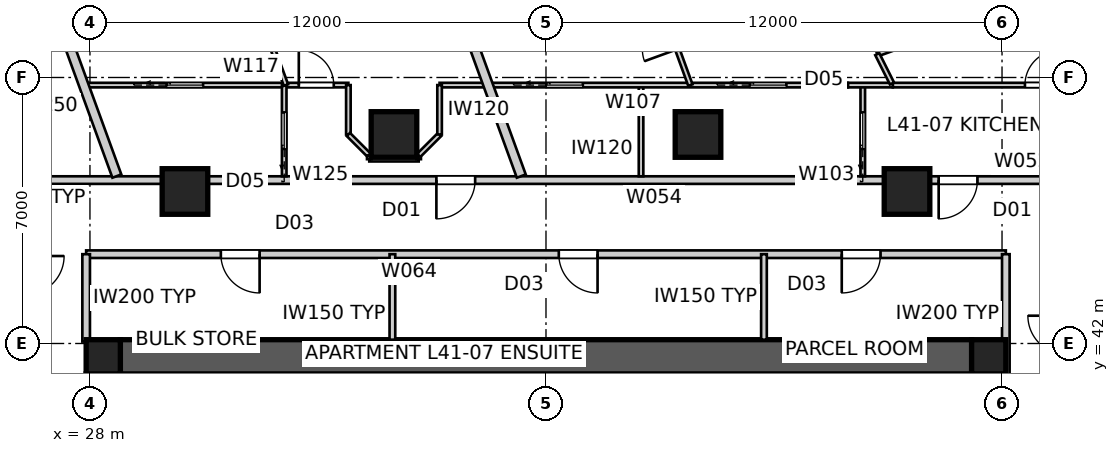
"""IFC4 building model, lengths in metres.
Left out: names, types, materials, properties, quantities, classifications, styles, units other than length and angle.
Written with IfcOpenShell. Run it as: python <this file> out.ifc"""

import sys

from ifc_helpers import new_model, si_unit, direction, frame, frame_2d, origin, origin_2d, place, context, subcontext, project, spatial, polyline, rectangle, outline, extrude, element, fill, save


model = new_model("IFC4")
c1 = context("Model", 3, precision=1e-05, world=origin(), true_north=direction((0.0, 1.0)))
c2 = subcontext(c1, "Body", "Model", "MODEL_VIEW")
j1 = project(units=[si_unit("LENGTHUNIT", "METRE"), si_unit("PLANEANGLEUNIT", "RADIAN")], contexts=[c1])
p1 = place(None, origin())
s1 = spatial("IfcSite", under=j1, at=p1, CompositionType="ELEMENT")
p2 = place(p1, origin())
s2 = spatial("IfcBuilding", under=s1, at=p2, CompositionType="ELEMENT")
p3 = place(p2, frame((0.0, 0.0, 150.6)))
s3 = spatial("IfcBuildingStorey", under=s2, at=p3, CompositionType="ELEMENT", Elevation=150.6)
p4 = place(p3, frame((28.8, 41.65, 0.0), z_axis=(0.0, 0.0, 1.0), x_axis=(1.0, 0.0, 0.0)))
e1 = element("IfcWall", 1, at=p4, inside=s3, PredefinedType="SHEAR", context=c2, shape_type="SweptSolid", body=[
    extrude(outline(polyline([(0.0, -0.45), (22.4, -0.45), (22.4, -0.025), (22.85, -0.025), (22.85, 0.025), (22.4, 0.025), (22.4, 0.45), (0.0, 0.45), (0.0, 0.025), (-0.45, 0.025), (-0.45, -0.025), (0.0, -0.025), (0.0, -0.45)])), origin(), (0.0, 0.0, 1.0), 3.4),
])
p5 = place(p3, frame((51.65, 18.8, 0.0), z_axis=(0.0, 0.0, 1.0), x_axis=(0.0, 1.0, 0.0)))
e2 = element("IfcWall", 2, at=p5, inside=s3, PredefinedType="SHEAR", context=c2, shape_type="SweptSolid", body=[
    extrude(outline(polyline([(0.0, -0.45), (22.4, -0.45), (22.4, -0.025), (22.85, -0.025), (22.85, 0.025), (22.4, 0.025), (22.4, 0.45), (0.0, 0.45), (0.0, 0.025), (-0.45, 0.025), (-0.45, -0.025), (0.0, -0.025), (0.0, -0.45)])), origin(), (0.0, 0.0, 1.0), 3.4),
])
p6 = place(p5, frame((11.14, 0.0, 0.0)))
e3 = element("IfcOpeningElement", 3, at=p6, cuts=e2, PredefinedType="OPENING", context=c2, shape_type="SweptSolid", body=[
    extrude(rectangle(XDim=1.02, YDim=2.4, at=frame_2d((0.51, 1.2))), frame((0.0, 0.46, 0.0), z_axis=(0.0, -1.0, 0.0), x_axis=(1.0, 0.0, 0.0)), (0.0, 0.0, 1.0), 0.92),
])
p7 = place(p3, frame((28.35, 41.2, 0.0), z_axis=(0.0, 0.0, 1.0), x_axis=(0.0, -1.0, 0.0)))
e4 = element("IfcWall", 4, at=p7, inside=s3, PredefinedType="SHEAR", context=c2, shape_type="SweptSolid", body=[
    extrude(outline(polyline([(0.0, -0.45), (22.4, -0.45), (22.4, -0.025), (22.85, -0.025), (22.85, 0.025), (22.4, 0.025), (22.4, 0.45), (0.0, 0.45), (0.0, 0.025), (-0.45, 0.025), (-0.45, -0.025), (0.0, -0.025), (0.0, -0.45)])), origin(), (0.0, 0.0, 1.0), 3.4),
])
p8 = place(p7, frame((11.14, 0.0, 0.0)))
e5 = element("IfcOpeningElement", 5, at=p8, cuts=e4, PredefinedType="OPENING", context=c2, shape_type="SweptSolid", body=[
    extrude(rectangle(XDim=1.02, YDim=2.4, at=frame_2d((0.51, 1.2))), frame((0.0, 0.46, 0.0), z_axis=(0.0, -1.0, 0.0), x_axis=(1.0, 0.0, 0.0)), (0.0, 0.0, 1.0), 0.92),
])
for number, where, z_axis, x_axis in (
    (6, (51.65, 41.65, 0.0), (0.0, 0.0, 1.0), (1.0, 0.0, 0.0)),
    (7, (28.35, 41.65, 0.0), (0.0, 0.0, 1.0), (1.0, 0.0, 0.0)),
):
    element("IfcColumn", number, at=place(p3, frame(where, z_axis=z_axis, x_axis=x_axis)), inside=s3, PredefinedType="COLUMN", context=c2, shape_type="SweptSolid", body=[
        extrude(rectangle(XDim=0.9, YDim=0.9, at=origin_2d()), origin(), (0.0, 0.0, 1.0), 3.4),
    ])
for number, where, z_axis, x_axis in (
    (8, (49.5, 46.0, 0.0), (0.0, 0.0, 1.0), (1.0, 0.0, 0.0)),
    (9, (44.0, 47.5, 0.0), (0.0, 0.0, 1.0), (1.0, 0.0, 0.0)),
    (10, (36.0, 47.5, 0.0), (0.0, 0.0, 1.0), (1.0, 0.0, 0.0)),
    (11, (30.5, 46.0, 0.0), (0.0, 0.0, 1.0), (1.0, 0.0, 0.0)),
):
    element("IfcColumn", number, at=place(p3, frame(where, z_axis=z_axis, x_axis=x_axis)), inside=s3, PredefinedType="COLUMN", context=c2, shape_type="SweptSolid", body=[
        extrude(rectangle(XDim=1.2, YDim=1.2, at=origin_2d()), origin(), (0.0, 0.0, 1.0), 3.4),
    ])
p9 = place(p3, frame((53.7, 46.3, 0.0), z_axis=(0.0, 0.0, 1.0), x_axis=(-1.0, 0.0, 0.0)))
e12 = element("IfcWall", 12, at=p9, inside=s3, PredefinedType="PARTITIONING", context=c2, shape_type="SweptSolid", body=[
    extrude(rectangle(XDim=4.458, YDim=0.2, at=frame_2d((2.229, 0.0))), origin(), (0.0, 0.0, 1.0), 3.25),
])
p10 = place(p9, frame((2.347, 0.0, 0.0)))
e13 = element("IfcOpeningElement", 13, at=p10, cuts=e12, PredefinedType="OPENING", context=c2, shape_type="SweptSolid", body=[
    extrude(rectangle(XDim=1.02, YDim=2.34, at=frame_2d((0.51, 1.17))), frame((0.0, 0.11, 0.0), z_axis=(0.0, -1.0, 0.0), x_axis=(1.0, 0.0, 0.0)), (0.0, 0.0, 1.0), 0.22),
])
p11 = place(p3, frame((49.242, 46.3, 0.0), z_axis=(0.0, 0.0, 1.0), x_axis=(-1.0, 0.0, 0.0)))
e14 = element("IfcWall", 14, at=p11, inside=s3, PredefinedType="PARTITIONING", context=c2, shape_type="SweptSolid", body=[
    extrude(rectangle(XDim=1.683, YDim=0.2, at=frame_2d((0.842, 0.0))), origin(), (0.0, 0.0, 1.0), 2.55),
])
p12 = place(p3, frame((47.558, 46.3, 0.0), z_axis=(0.0, 0.0, 1.0), x_axis=(-1.0, 0.0, 0.0)))
e15 = element("IfcWall", 15, at=p12, inside=s3, PredefinedType="PARTITIONING", context=c2, shape_type="SweptSolid", body=[
    extrude(rectangle(XDim=15.117, YDim=0.2, at=frame_2d((7.558, 0.0))), origin(), (0.0, 0.0, 1.0), 3.25),
])
p13 = place(p12, frame((9.422, 0.0, 0.0)))
e16 = element("IfcOpeningElement", 16, at=p13, cuts=e15, PredefinedType="OPENING", context=c2, shape_type="SweptSolid", body=[
    extrude(rectangle(XDim=1.02, YDim=2.34, at=frame_2d((0.51, 1.17))), frame((0.0, 0.11, 0.0), z_axis=(0.0, -1.0, 0.0), x_axis=(1.0, 0.0, 0.0)), (0.0, 0.0, 1.0), 0.22),
])
p14 = place(p3, frame((32.442, 46.3, 0.0), z_axis=(0.0, 0.0, 1.0), x_axis=(-1.0, 0.0, 0.0)))
e17 = element("IfcWall", 17, at=p14, inside=s3, PredefinedType="PARTITIONING", context=c2, shape_type="SweptSolid", body=[
    extrude(rectangle(XDim=1.683, YDim=0.2, at=frame_2d((0.842, 0.0))), origin(), (0.0, 0.0, 1.0), 2.55),
])
p15 = place(p3, frame((30.758, 46.3, 0.0), z_axis=(0.0, 0.0, 1.0), x_axis=(-1.0, 0.0, 0.0)))
e18 = element("IfcWall", 18, at=p15, inside=s3, PredefinedType="PARTITIONING", context=c2, shape_type="SweptSolid", body=[
    extrude(rectangle(XDim=4.458, YDim=0.2, at=frame_2d((2.229, 0.0))), origin(), (0.0, 0.0, 1.0), 3.25),
])
p16 = place(p3, frame((36.49, 54.263, 0.0), z_axis=(0.0, 0.0, 1.0), x_axis=(0.342019678743, -0.93969278988, 0.0)))
e19 = element("IfcWall", 19, at=p16, inside=s3, PredefinedType="PARTITIONING", context=c2, shape_type="SweptSolid", body=[
    extrude(rectangle(XDim=8.362, YDim=0.25, at=frame_2d((4.181, 0.0))), origin(), (0.0, 0.0, 1.0), 3.25),
])
p17 = place(p3, frame((27.093, 50.843, 0.0), z_axis=(0.0, 0.0, 1.0), x_axis=(0.342012883883, -0.939695262975, 0.0)))
e20 = element("IfcWall", 20, at=p17, inside=s3, PredefinedType="PARTITIONING", context=c2, shape_type="SweptSolid", body=[
    extrude(rectangle(XDim=4.722, YDim=0.25, at=frame_2d((2.361, 0.0))), origin(), (0.0, 0.0, 1.0), 3.25),
])
p18 = place(p3, frame((52.1, 44.35, 0.0), z_axis=(0.0, 0.0, 1.0), x_axis=(-1.0, 0.0, 0.0)))
e21 = element("IfcWall", 21, at=p18, inside=s3, PredefinedType="PARTITIONING", context=c2, shape_type="SweptSolid", body=[
    extrude(rectangle(XDim=24.2, YDim=0.2, at=frame_2d((12.1, 0.0))), origin(), (0.0, 0.0, 1.0), 3.25),
])
p19 = place(p18, frame((10.743, 0.0, 0.0)))
e22 = element("IfcOpeningElement", 22, at=p19, cuts=e21, PredefinedType="OPENING", context=c2, shape_type="SweptSolid", body=[
    extrude(rectangle(XDim=1.02, YDim=2.1, at=frame_2d((0.51, 1.05))), frame((0.0, 0.11, 0.0), z_axis=(0.0, -1.0, 0.0), x_axis=(1.0, 0.0, 0.0)), (0.0, 0.0, 1.0), 0.22),
])
p20 = place(p18, frame((19.636, 0.0, 0.0)))
e23 = element("IfcOpeningElement", 23, at=p20, cuts=e21, PredefinedType="OPENING", context=c2, shape_type="SweptSolid", body=[
    extrude(rectangle(XDim=1.02, YDim=2.1, at=frame_2d((0.51, 1.05))), frame((0.0, 0.11, 0.0), z_axis=(0.0, -1.0, 0.0), x_axis=(1.0, 0.0, 0.0)), (0.0, 0.0, 1.0), 0.22),
])
p21 = place(p18, frame((3.297, 0.0, 0.0)))
e24 = element("IfcOpeningElement", 24, at=p21, cuts=e21, PredefinedType="OPENING", context=c2, shape_type="SweptSolid", body=[
    extrude(rectangle(XDim=1.02, YDim=2.1, at=frame_2d((0.51, 1.05))), frame((0.0, 0.11, 0.0), z_axis=(0.0, -1.0, 0.0), x_axis=(1.0, 0.0, 0.0)), (0.0, 0.0, 1.0), 0.22),
])
p22 = place(p3, frame((27.9, 44.35, 0.0), z_axis=(0.0, 0.0, 1.0), x_axis=(0.0, -1.0, 0.0)))
e25 = element("IfcWall", 25, at=p22, inside=s3, PredefinedType="PARTITIONING", context=c2, shape_type="SweptSolid", body=[
    extrude(rectangle(XDim=2.3, YDim=0.2, at=frame_2d((1.15, 0.0))), origin(), (0.0, 0.0, 1.0), 3.25),
])
p23 = place(p3, frame((52.1, 41.18, 0.0), z_axis=(0.0, 0.0, 1.0), x_axis=(0.0, 1.0, 0.0)))
e26 = element("IfcWall", 26, at=p23, inside=s3, PredefinedType="PARTITIONING", context=c2, shape_type="SweptSolid", body=[
    extrude(rectangle(XDim=3.17, YDim=0.2, at=frame_2d((1.585, 0.0))), origin(), (0.0, 0.0, 1.0), 3.25),
])
p24 = place(p3, frame((35.958, 42.1, 0.0), z_axis=(0.0, 0.0, 1.0), x_axis=(0.0, 1.0, 0.0)))
e27 = element("IfcWall", 27, at=p24, inside=s3, PredefinedType="SOLIDWALL", context=c2, shape_type="SweptSolid", body=[
    extrude(rectangle(XDim=2.25, YDim=0.15, at=frame_2d((1.125, 0.0))), origin(), (0.0, 0.0, 1.0), 3.25),
])
p25 = place(p3, frame((45.735, 42.1, 0.0), z_axis=(0.0, 0.0, 1.0), x_axis=(0.0, 1.0, 0.0)))
e28 = element("IfcWall", 28, at=p25, inside=s3, PredefinedType="SOLIDWALL", context=c2, shape_type="SweptSolid", body=[
    extrude(rectangle(XDim=2.25, YDim=0.15, at=frame_2d((1.125, 0.0))), origin(), (0.0, 0.0, 1.0), 2.796),
])
p26 = place(p3, frame((48.336, 46.4, 0.0), z_axis=(0.0, 0.0, 1.0), x_axis=(0.0, 1.0, 0.0)))
e29 = element("IfcWall", 29, at=p26, inside=s3, PredefinedType="PARTITIONING", context=c2, shape_type="SweptSolid", body=[
    extrude(rectangle(XDim=2.4, YDim=0.12, at=frame_2d((1.2, 0.0))), origin(), (0.0, 0.0, 1.0), 3.25),
])
p27 = place(p26, frame((0.72, 0.0, 0.0)))
e30 = element("IfcOpeningElement", 30, at=p27, cuts=e29, PredefinedType="OPENING", context=c2, shape_type="SweptSolid", body=[
    extrude(rectangle(XDim=0.96, YDim=2.1, at=frame_2d((0.48, 1.05))), frame((0.0, 0.07, 0.0), z_axis=(0.0, -1.0, 0.0), x_axis=(1.0, 0.0, 0.0)), (0.0, 0.0, 1.0), 0.14),
])
p28 = place(p3, frame((49.126, 48.8, 0.0), z_axis=(0.0, 0.0, 1.0), x_axis=(1.0, 0.0, 0.0)))
e31 = element("IfcWall", 31, at=p28, inside=s3, PredefinedType="PARTITIONING", context=c2, shape_type="SweptSolid", body=[
    extrude(rectangle(XDim=7.874, YDim=0.12, at=frame_2d((3.937, 0.0))), origin(), (0.0, 0.0, 1.0), 3.25),
])
p29 = place(p28, frame((3.477, 0.0, 0.0)))
e32 = element("IfcOpeningElement", 32, at=p29, cuts=e31, PredefinedType="OPENING", context=c2, shape_type="SweptSolid", body=[
    extrude(rectangle(XDim=0.92, YDim=2.34, at=frame_2d((0.46, 1.17))), frame((0.0, 0.07, 0.0), z_axis=(0.0, -1.0, 0.0), x_axis=(1.0, 0.0, 0.0)), (0.0, 0.0, 1.0), 0.14),
])
p30 = place(p3, frame((42.501, 46.4, 0.0), z_axis=(0.0, 0.0, 1.0), x_axis=(0.0, 1.0, 0.0)))
e33 = element("IfcWall", 33, at=p30, inside=s3, PredefinedType="PARTITIONING", context=c2, shape_type="SweptSolid", body=[
    extrude(rectangle(XDim=2.4, YDim=0.12, at=frame_2d((1.2, 0.0))), origin(), (0.0, 0.0, 1.0), 3.25),
])
p31 = place(p3, frame((37.2, 48.8, 0.0), z_axis=(0.0, 0.0, 1.0), x_axis=(1.0, 0.0, 0.0)))
e34 = element("IfcWall", 34, at=p31, inside=s3, PredefinedType="PARTITIONING", context=c2, shape_type="SweptSolid", body=[
    extrude(rectangle(XDim=10.745, YDim=0.12, at=frame_2d((5.373, 0.0))), origin(), (0.0, 0.0, 1.0), 3.25),
])
p32 = place(p31, frame((8.165, 0.0, 0.0)))
e35 = element("IfcOpeningElement", 35, at=p32, cuts=e34, PredefinedType="OPENING", context=c2, shape_type="SweptSolid", body=[
    extrude(rectangle(XDim=0.96, YDim=2.1, at=frame_2d((0.48, 1.05))), frame((0.0, 0.07, 0.0), z_axis=(0.0, -1.0, 0.0), x_axis=(1.0, 0.0, 0.0)), (0.0, 0.0, 1.0), 0.14),
])
p33 = place(p31, frame((2.81, 0.0, 0.0)))
e36 = element("IfcOpeningElement", 36, at=p33, cuts=e34, PredefinedType="OPENING", context=c2, shape_type="SweptSolid", body=[
    extrude(rectangle(XDim=0.96, YDim=2.1, at=frame_2d((0.48, 1.05))), frame((0.0, 0.07, 0.0), z_axis=(0.0, -1.0, 0.0), x_axis=(1.0, 0.0, 0.0)), (0.0, 0.0, 1.0), 0.14),
])
p34 = place(p3, frame((43.799, 48.8, 0.0), z_axis=(0.0, 0.0, 1.0), x_axis=(-0.342034943783, 0.939687233728, 0.0)))
e37 = element("IfcWall", 37, at=p34, inside=s3, PredefinedType="PARTITIONING", context=c2, shape_type="SweptSolid", body=[
    extrude(rectangle(XDim=3.223, YDim=0.12, at=frame_2d((1.612, 0.0))), origin(), (0.0, 0.0, 1.0), 3.25),
])
p35 = place(p34, frame((1.004, 0.0, 0.0)))
e38 = element("IfcOpeningElement", 38, at=p35, cuts=e37, PredefinedType="OPENING", context=c2, shape_type="SweptSolid", body=[
    extrude(rectangle(XDim=0.92, YDim=2.34, at=frame_2d((0.46, 1.17))), frame((0.0, 0.07, 0.0), z_axis=(0.0, -1.0, 0.0), x_axis=(1.0, 0.0, 0.0)), (0.0, 0.0, 1.0), 0.14),
])
p36 = place(p3, frame((57.231, 52.713, 0.0), z_axis=(0.0, 0.0, 1.0), x_axis=(-0.939692673089, -0.342019999623, 0.0)))
e39 = element("IfcWall", 39, at=p36, inside=s3, PredefinedType="PARTITIONING", context=c2, shape_type="SweptSolid", body=[
    extrude(rectangle(XDim=9.06, YDim=0.12, at=frame_2d((4.53, 0.0))), origin(), (0.0, 0.0, 1.0), 3.25),
])
p37 = place(p3, frame((48.717, 49.615, 0.0), z_axis=(0.0, 0.0, 1.0), x_axis=(0.448117513314, -0.893974660861, 0.0)))
e40 = element("IfcWall", 40, at=p37, inside=s3, PredefinedType="PARTITIONING", context=c2, shape_type="SweptSolid", body=[
    extrude(rectangle(XDim=0.864, YDim=0.12, at=frame_2d((0.432, 0.0))), origin(), (0.0, 0.0, 1.0), 3.25),
])
p38 = place(p3, frame((27.836, 48.8, 0.0), z_axis=(0.0, 0.0, 1.0), x_axis=(1.0, 0.0, 0.0)))
e41 = element("IfcWall", 41, at=p38, inside=s3, PredefinedType="PARTITIONING", context=c2, shape_type="SweptSolid", body=[
    extrude(rectangle(XDim=6.964, YDim=0.12, at=frame_2d((3.482, 0.0))), origin(), (0.0, 0.0, 1.0), 3.25),
])
p39 = place(p38, frame((5.659, 0.0, 0.0)))
e42 = element("IfcOpeningElement", 42, at=p39, cuts=e41, PredefinedType="OPENING", context=c2, shape_type="SweptSolid", body=[
    extrude(rectangle(XDim=0.92, YDim=2.34, at=frame_2d((0.46, 1.17))), frame((0.0, 0.07, 0.0), z_axis=(0.0, -1.0, 0.0), x_axis=(1.0, 0.0, 0.0)), (0.0, 0.0, 1.0), 0.14),
])
p40 = place(p38, frame((2.18, 0.0, 0.0)))
e43 = element("IfcOpeningElement", 43, at=p40, cuts=e41, PredefinedType="OPENING", context=c2, shape_type="SweptSolid", body=[
    extrude(rectangle(XDim=0.96, YDim=2.1, at=frame_2d((0.48, 1.05))), frame((0.0, 0.07, 0.0), z_axis=(0.0, -1.0, 0.0), x_axis=(1.0, 0.0, 0.0)), (0.0, 0.0, 1.0), 0.14),
])
p41 = place(p3, frame((34.8, 48.8, 0.0), z_axis=(0.0, 0.0, 1.0), x_axis=(0.0, -1.0, 0.0)))
e44 = element("IfcWall", 44, at=p41, inside=s3, PredefinedType="PARTITIONING", context=c2, shape_type="SweptSolid", body=[
    extrude(rectangle(XDim=1.3, YDim=0.12, at=frame_2d((0.65, 0.0))), origin(), (0.0, 0.0, 1.0), 3.25),
])
p42 = place(p3, frame((34.8, 47.5, 0.0), z_axis=(0.0, 0.0, 1.0), x_axis=(0.707106781187, -0.707106781187, 0.0)))
e45 = element("IfcWall", 45, at=p42, inside=s3, PredefinedType="PARTITIONING", context=c2, shape_type="SweptSolid", body=[
    extrude(rectangle(XDim=0.778, YDim=0.12, at=frame_2d((0.389, 0.0))), origin(), (0.0, 0.0, 1.0), 3.25),
])
p43 = place(p3, frame((35.35, 46.85, 0.0), z_axis=(0.0, 0.0, 1.0), x_axis=(1.0, 0.0, 0.0)))
e46 = element("IfcWall", 46, at=p43, inside=s3, PredefinedType="PARTITIONING", context=c2, shape_type="SweptSolid", body=[
    extrude(rectangle(XDim=1.3, YDim=0.12, at=frame_2d((0.65, 0.0))), origin(), (0.0, 0.0, 1.0), 3.25),
])
p44 = place(p3, frame((36.65, 46.95, 0.0), z_axis=(0.0, 0.0, 1.0), x_axis=(0.707106781187, 0.707106781187, 0.0)))
e47 = element("IfcWall", 47, at=p44, inside=s3, PredefinedType="PARTITIONING", context=c2, shape_type="SweptSolid", body=[
    extrude(rectangle(XDim=0.778, YDim=0.12, at=frame_2d((0.389, 0.0))), origin(), (0.0, 0.0, 1.0), 3.25),
])
p45 = place(p3, frame((37.2, 47.5, 0.0), z_axis=(0.0, 0.0, 1.0), x_axis=(0.0, 1.0, 0.0)))
e48 = element("IfcWall", 48, at=p45, inside=s3, PredefinedType="PARTITIONING", context=c2, shape_type="SweptSolid", body=[
    extrude(rectangle(XDim=1.3, YDim=0.12, at=frame_2d((0.65, 0.0))), origin(), (0.0, 0.0, 1.0), 3.25),
])
p46 = place(p3, frame((33.112, 46.4, 0.0), z_axis=(0.0, 0.0, 1.0), x_axis=(0.0, 1.0, 0.0)))
e49 = element("IfcWall", 49, at=p46, inside=s3, PredefinedType="PARTITIONING", context=c2, shape_type="SweptSolid", body=[
    extrude(rectangle(XDim=2.4, YDim=0.12, at=frame_2d((1.2, 0.0))), origin(), (0.0, 0.0, 1.0), 3.25),
])
p47 = place(p46, frame((0.72, 0.0, 0.0)))
e50 = element("IfcOpeningElement", 50, at=p47, cuts=e49, PredefinedType="OPENING", context=c2, shape_type="SweptSolid", body=[
    extrude(rectangle(XDim=0.96, YDim=2.1, at=frame_2d((0.48, 1.05))), frame((0.0, 0.07, 0.0), z_axis=(0.0, -1.0, 0.0), x_axis=(1.0, 0.0, 0.0)), (0.0, 0.0, 1.0), 0.14),
])
p48 = place(p3, frame((33.157, 48.8, 0.0), z_axis=(0.0, 0.0, 1.0), x_axis=(-0.341990966768, 0.939703239672, 0.0)))
e51 = element("IfcWall", 51, at=p48, inside=s3, PredefinedType="PARTITIONING", context=c2, shape_type="SweptSolid", body=[
    extrude(rectangle(XDim=3.953, YDim=0.12, at=frame_2d((1.977, 0.0))), origin(), (0.0, 0.0, 1.0), 3.25),
])
p49 = place(p3, frame((49.126, 48.8, 0.0), z_axis=(0.0, 0.0, 1.0), x_axis=(-1.0, 0.0, 0.0)))
e52 = element("IfcWall", 52, at=p49, inside=s3, PredefinedType="PARTITIONING", context=c2, shape_type="SweptSolid", body=[
    extrude(rectangle(XDim=1.181, YDim=0.12, at=frame_2d((0.59, 0.0))), origin(), (0.0, 0.0, 1.0), 3.25),
])
for number, where, z_axis, x_axis in (
    (53, (35.35, 46.85, 0.0), (0.0, 0.0, 1.0), (0.0, 1.0, 0.0)),
    (54, (36.65, 46.85, 0.0), (0.0, 0.0, 1.0), (0.0, 1.0, 0.0)),
):
    element("IfcWall", number, at=place(p3, frame(where, z_axis=z_axis, x_axis=x_axis)), inside=s3, PredefinedType="PARTITIONING", context=c2, shape_type="SweptSolid", body=[
        extrude(rectangle(XDim=0.1, YDim=0.12, at=frame_2d((0.05, 0.0))), origin(), (0.0, 0.0, 1.0), 3.25),
    ])
p50 = place(p19, origin())
e55 = element("IfcDoor", 55, at=p50, inside=s3, OperationType="SINGLE_SWING_LEFT", PredefinedType="DOOR", context=c2, shape_type="SweptSolid", body=[
    extrude(rectangle(XDim=1.02, YDim=2.1, at=frame_2d((0.51, 1.05))), frame((0.0, 0.025, 0.0), z_axis=(0.0, -1.0, 0.0), x_axis=(1.0, 0.0, 0.0)), (0.0, 0.0, 1.0), 0.05),
])
fill(e22, e55)
p51 = place(p20, origin())
e56 = element("IfcDoor", 56, at=p51, inside=s3, OperationType="SINGLE_SWING_LEFT", PredefinedType="DOOR", context=c2, shape_type="SweptSolid", body=[
    extrude(rectangle(XDim=1.02, YDim=2.1, at=frame_2d((0.51, 1.05))), frame((0.0, 0.025, 0.0), z_axis=(0.0, -1.0, 0.0), x_axis=(1.0, 0.0, 0.0)), (0.0, 0.0, 1.0), 0.05),
])
fill(e23, e56)
p52 = place(p13, origin())
e57 = element("IfcDoor", 57, at=p52, inside=s3, OperationType="SINGLE_SWING_RIGHT", PredefinedType="DOOR", context=c2, shape_type="SweptSolid", body=[
    extrude(rectangle(XDim=1.02, YDim=2.34, at=frame_2d((0.51, 1.17))), frame((0.0, 0.025, 0.0), z_axis=(0.0, -1.0, 0.0), x_axis=(1.0, 0.0, 0.0)), (0.0, 0.0, 1.0), 0.05),
])
fill(e16, e57)
p53 = place(p21, origin())
e58 = element("IfcDoor", 58, at=p53, inside=s3, OperationType="SINGLE_SWING_RIGHT", PredefinedType="DOOR", context=c2, shape_type="SweptSolid", body=[
    extrude(rectangle(XDim=1.02, YDim=2.1, at=frame_2d((0.51, 1.05))), frame((0.0, 0.025, 0.0), z_axis=(0.0, -1.0, 0.0), x_axis=(1.0, 0.0, 0.0)), (0.0, 0.0, 1.0), 0.05),
])
fill(e24, e58)
p54 = place(p10, origin())
e59 = element("IfcDoor", 59, at=p54, inside=s3, OperationType="SINGLE_SWING_RIGHT", PredefinedType="DOOR", context=c2, shape_type="SweptSolid", body=[
    extrude(rectangle(XDim=1.02, YDim=2.34, at=frame_2d((0.51, 1.17))), frame((0.0, 0.025, 0.0), z_axis=(0.0, -1.0, 0.0), x_axis=(1.0, 0.0, 0.0)), (0.0, 0.0, 1.0), 0.05),
])
fill(e13, e59)
p55 = place(p47, origin())
e60 = element("IfcDoor", 60, at=p55, inside=s3, OperationType="SLIDING_TO_LEFT", PredefinedType="DOOR", context=c2, shape_type="SweptSolid", body=[
    extrude(rectangle(XDim=0.96, YDim=2.1, at=frame_2d((0.48, 1.05))), frame((0.0, 0.025, 0.0), z_axis=(0.0, -1.0, 0.0), x_axis=(1.0, 0.0, 0.0)), (0.0, 0.0, 1.0), 0.05),
])
fill(e50, e60)
p56 = place(p39, origin())
e61 = element("IfcDoor", 61, at=p56, inside=s3, OperationType="SINGLE_SWING_LEFT", PredefinedType="DOOR", context=c2, shape_type="SweptSolid", body=[
    extrude(rectangle(XDim=0.92, YDim=2.34, at=frame_2d((0.46, 1.17))), frame((0.0, 0.025, 0.0), z_axis=(0.0, -1.0, 0.0), x_axis=(1.0, 0.0, 0.0)), (0.0, 0.0, 1.0), 0.05),
])
fill(e42, e61)
p57 = place(p29, origin())
e62 = element("IfcDoor", 62, at=p57, inside=s3, OperationType="SINGLE_SWING_RIGHT", PredefinedType="DOOR", context=c2, shape_type="SweptSolid", body=[
    extrude(rectangle(XDim=0.92, YDim=2.34, at=frame_2d((0.46, 1.17))), frame((0.0, 0.025, 0.0), z_axis=(0.0, -1.0, 0.0), x_axis=(1.0, 0.0, 0.0)), (0.0, 0.0, 1.0), 0.05),
])
fill(e32, e62)
p58 = place(p27, origin())
e63 = element("IfcDoor", 63, at=p58, inside=s3, OperationType="SLIDING_TO_LEFT", PredefinedType="DOOR", context=c2, shape_type="SweptSolid", body=[
    extrude(rectangle(XDim=0.96, YDim=2.1, at=frame_2d((0.48, 1.05))), frame((0.0, 0.025, 0.0), z_axis=(0.0, -1.0, 0.0), x_axis=(1.0, 0.0, 0.0)), (0.0, 0.0, 1.0), 0.05),
])
fill(e30, e63)
p59 = place(p40, origin())
e64 = element("IfcDoor", 64, at=p59, inside=s3, OperationType="SLIDING_TO_LEFT", PredefinedType="DOOR", context=c2, shape_type="SweptSolid", body=[
    extrude(rectangle(XDim=0.96, YDim=2.1, at=frame_2d((0.48, 1.05))), frame((0.0, 0.025, 0.0), z_axis=(0.0, -1.0, 0.0), x_axis=(1.0, 0.0, 0.0)), (0.0, 0.0, 1.0), 0.05),
])
fill(e43, e64)
p60 = place(p32, origin())
e65 = element("IfcDoor", 65, at=p60, inside=s3, OperationType="SLIDING_TO_LEFT", PredefinedType="DOOR", context=c2, shape_type="SweptSolid", body=[
    extrude(rectangle(XDim=0.96, YDim=2.1, at=frame_2d((0.48, 1.05))), frame((0.0, 0.025, 0.0), z_axis=(0.0, -1.0, 0.0), x_axis=(1.0, 0.0, 0.0)), (0.0, 0.0, 1.0), 0.05),
])
fill(e35, e65)
p61 = place(p33, origin())
e66 = element("IfcDoor", 66, at=p61, inside=s3, OperationType="SLIDING_TO_LEFT", PredefinedType="DOOR", context=c2, shape_type="SweptSolid", body=[
    extrude(rectangle(XDim=0.96, YDim=2.1, at=frame_2d((0.48, 1.05))), frame((0.0, 0.025, 0.0), z_axis=(0.0, -1.0, 0.0), x_axis=(1.0, 0.0, 0.0)), (0.0, 0.0, 1.0), 0.05),
])
fill(e36, e66)
save(model, sys.argv[1])
